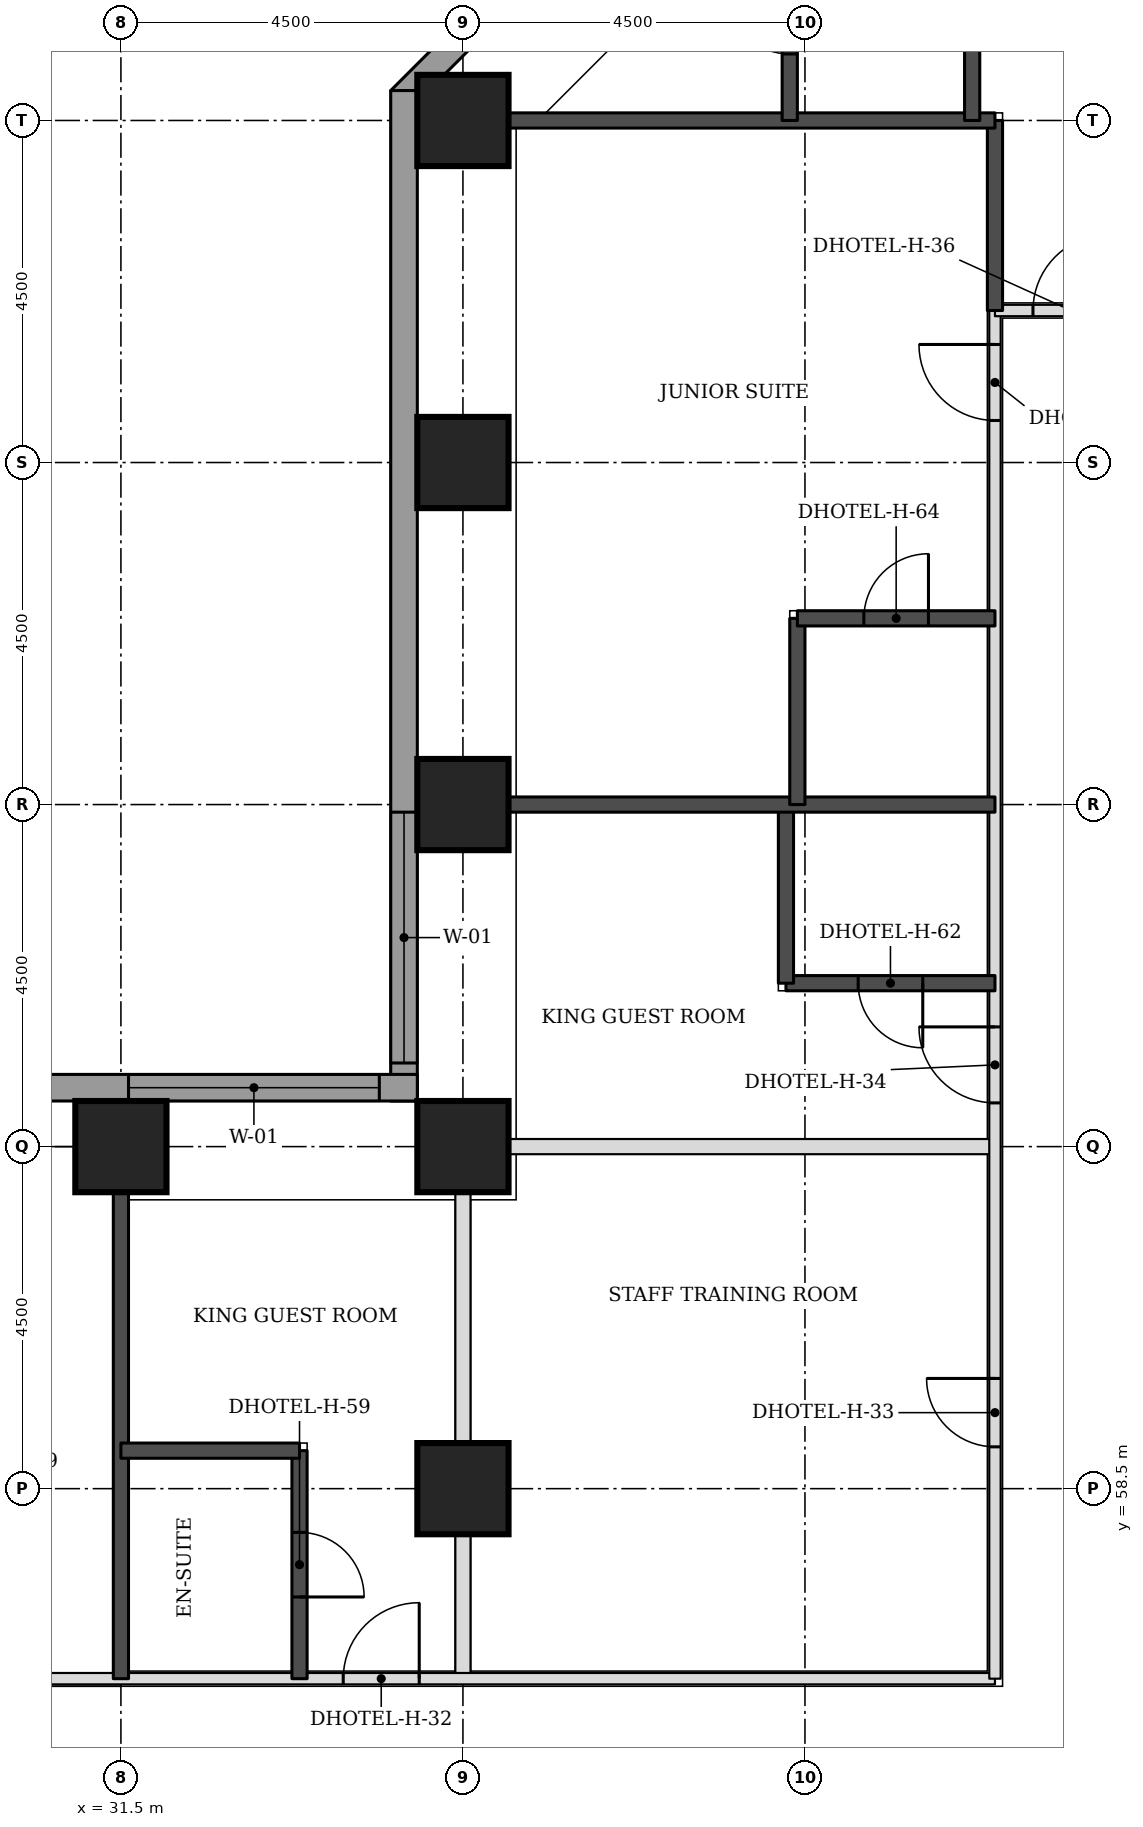
"""IFC4 building model, lengths in metres.
Left out: names, types, materials, properties, quantities, classifications, styles, units other than length and angle.
Written with IfcOpenShell. Run it as: python <this file> out.ifc"""

import sys

from ifc_helpers import new_model, si_unit, direction, frame, frame_2d, origin, origin_2d, place, context, subcontext, project, spatial, rectangle, extrude, element, fill, save


model = new_model("IFC4")
c1 = context("Model", 3, precision=1e-05, world=origin(), true_north=direction((0.0, 1.0)))
c2 = subcontext(c1, "Body", "Model", "MODEL_VIEW")
j1 = project(units=[si_unit("LENGTHUNIT", "METRE"), si_unit("PLANEANGLEUNIT", "RADIAN")], contexts=[c1])
p1 = place(None, origin())
s1 = spatial("IfcSite", under=j1, at=p1, CompositionType="ELEMENT")
p2 = place(p1, origin())
s2 = spatial("IfcBuilding", under=s1, at=p2, CompositionType="ELEMENT")
p3 = place(p2, frame((0.0, 0.0, 46.2)))
s3 = spatial("IfcBuildingStorey", under=s2, at=p3, CompositionType="ELEMENT", Elevation=46.2)
for number, where, z_axis, x_axis in (
    (1, (36.0, 58.5, 0.0), (0.0, 0.0, 1.0), (1.0, 0.0, 0.0)),
    (2, (31.5, 63.0, 0.0), (0.0, 0.0, 1.0), (1.0, 0.0, 0.0)),
    (3, (36.0, 63.0, 0.0), (0.0, 0.0, 1.0), (1.0, 0.0, 0.0)),
    (4, (36.0, 67.5, 0.0), (0.0, 0.0, 1.0), (1.0, 0.0, 0.0)),
    (5, (36.0, 72.0, 0.0), (0.0, 0.0, 1.0), (1.0, 0.0, 0.0)),
    (6, (36.0, 76.5, 0.0), (0.0, 0.0, 1.0), (1.0, 0.0, 0.0)),
):
    element("IfcColumn", number, at=place(p3, frame(where, z_axis=z_axis, x_axis=x_axis)), inside=s3, PredefinedType="COLUMN", context=c2, shape_type="SweptSolid", body=[
        extrude(rectangle(XDim=1.2, YDim=1.2, at=origin_2d()), origin(), (0.0, 0.0, 1.0), 3.3),
    ])
p4 = place(p3, frame((40.23, 81.826, 0.0), z_axis=(0.0, 0.0, 1.0), x_axis=(-0.707106781187, -0.707106781187, 0.0)))
e7 = element("IfcWall", 7, at=p4, inside=s3, PredefinedType="STANDARD", context=c2, shape_type="SweptSolid", body=[
    extrude(rectangle(XDim=7.151, YDim=0.35, at=frame_2d((3.576, 0.0))), origin(), (0.0, 0.0, 1.0), 3.055),
])
p5 = place(p4, frame((1.926, 0.0, 0.8)))
e8 = element("IfcOpeningElement", 8, at=p5, cuts=e7, PredefinedType="OPENING", context=c2, shape_type="SweptSolid", body=[
    extrude(rectangle(XDim=3.3, YDim=1.5, at=frame_2d((1.65, 0.75))), frame((0.0, 0.185, 0.0), z_axis=(0.0, -1.0, 0.0), x_axis=(1.0, 0.0, 0.0)), (0.0, 0.0, 1.0), 0.37),
])
p6 = place(p3, frame((35.225, 76.894, 0.0), z_axis=(0.0, 0.0, 1.0), x_axis=(0.0, -1.0, 0.0)))
e9 = element("IfcWall", 9, at=p6, inside=s3, PredefinedType="STANDARD", context=c2, shape_type="SweptSolid", body=[
    extrude(rectangle(XDim=13.293, YDim=0.35, at=frame_2d((6.647, 0.0))), origin(), (0.0, 0.0, 1.0), 3.055),
])
p7 = place(p6, frame((9.493, 0.0, 0.8)))
e10 = element("IfcOpeningElement", 10, at=p7, cuts=e9, PredefinedType="OPENING", context=c2, shape_type="SweptSolid", body=[
    extrude(rectangle(XDim=3.3, YDim=1.5, at=frame_2d((1.65, 0.75))), frame((0.0, 0.185, 0.0), z_axis=(0.0, -1.0, 0.0), x_axis=(1.0, 0.0, 0.0)), (0.0, 0.0, 1.0), 0.37),
])
p8 = place(p3, frame((35.4, 63.775, 0.0), z_axis=(0.0, 0.0, 1.0), x_axis=(-1.0, 0.0, 0.0)))
e11 = element("IfcWall", 11, at=p8, inside=s3, PredefinedType="STANDARD", context=c2, shape_type="SweptSolid", body=[
    extrude(rectangle(XDim=17.793, YDim=0.35, at=frame_2d((8.897, 0.0))), origin(), (0.0, 0.0, 1.0), 3.055),
])
p9 = place(p8, frame((0.5, 0.0, 0.8)))
e12 = element("IfcOpeningElement", 12, at=p9, cuts=e11, PredefinedType="OPENING", context=c2, shape_type="SweptSolid", body=[
    extrude(rectangle(XDim=3.3, YDim=1.5, at=frame_2d((1.65, 0.75))), frame((0.0, 0.185, 0.0), z_axis=(0.0, -1.0, 0.0), x_axis=(1.0, 0.0, 0.0)), (0.0, 0.0, 1.0), 0.37),
])
p10 = place(p8, frame((9.0, 0.0, 0.8)))
e13 = element("IfcOpeningElement", 13, at=p10, cuts=e11, PredefinedType="OPENING", context=c2, shape_type="SweptSolid", body=[
    extrude(rectangle(XDim=3.3, YDim=1.5, at=frame_2d((1.65, 0.75))), frame((0.0, 0.185, 0.0), z_axis=(0.0, -1.0, 0.0), x_axis=(1.0, 0.0, 0.0)), (0.0, 0.0, 1.0), 0.37),
])
p11 = place(p3, frame((36.0, 56.0, 0.0), z_axis=(0.0, 0.0, 1.0), x_axis=(0.0, 1.0, 0.0)))
e14 = element("IfcWall", 14, at=p11, inside=s3, PredefinedType="PARTITIONING", context=c2, shape_type="SweptSolid", body=[
    extrude(rectangle(XDim=6.4, YDim=0.2, at=frame_2d((3.2, 0.0))), origin(), (0.0, 0.0, 1.0), 2.33),
])
p12 = place(p3, frame((36.6, 63.0, 0.0), z_axis=(0.0, 0.0, 1.0), x_axis=(1.0, 0.0, 0.0)))
e15 = element("IfcWall", 15, at=p12, inside=s3, PredefinedType="PARTITIONING", context=c2, shape_type="SweptSolid", body=[
    extrude(rectangle(XDim=6.4, YDim=0.2, at=frame_2d((3.2, 0.0))), origin(), (0.0, 0.0, 1.0), 3.08),
])
p13 = place(p3, frame((27.0, 56.0, 0.0), z_axis=(0.0, 0.0, 1.0), x_axis=(1.0, 0.0, 0.0)))
e16 = element("IfcWall", 16, at=p13, inside=s3, PredefinedType="PARTITIONING", context=c2, shape_type="SweptSolid", body=[
    extrude(rectangle(XDim=16.0, YDim=0.15, at=frame_2d((8.0, 0.0))), origin(), (0.0, 0.0, 1.0), 3.08),
])
p14 = place(p13, frame((7.425, 0.0, 0.0)))
e17 = element("IfcOpeningElement", 17, at=p14, cuts=e16, PredefinedType="OPENING", context=c2, shape_type="SweptSolid", body=[
    extrude(rectangle(XDim=1.0, YDim=2.1, at=frame_2d((0.5, 1.05))), frame((0.0, 0.085, 0.0), z_axis=(0.0, -1.0, 0.0), x_axis=(1.0, 0.0, 0.0)), (0.0, 0.0, 1.0), 0.17),
])
p15 = place(p13, frame((1.91, 0.0, 0.0)))
e18 = element("IfcOpeningElement", 18, at=p15, cuts=e16, PredefinedType="OPENING", context=c2, shape_type="SweptSolid", body=[
    extrude(rectangle(XDim=0.9, YDim=2.1, at=frame_2d((0.45, 1.05))), frame((0.0, 0.085, 0.0), z_axis=(0.0, -1.0, 0.0), x_axis=(1.0, 0.0, 0.0)), (0.0, 0.0, 1.0), 0.17),
])
p16 = place(p3, frame((43.0, 56.0, 0.0), z_axis=(0.0, 0.0, 1.0), x_axis=(0.0, 1.0, 0.0)))
e19 = element("IfcWall", 19, at=p16, inside=s3, PredefinedType="PARTITIONING", context=c2, shape_type="SweptSolid", body=[
    extrude(rectangle(XDim=18.0, YDim=0.15, at=frame_2d((9.0, 0.0))), origin(), (0.0, 0.0, 1.0), 3.08),
])
p17 = place(p16, frame((7.575, 0.0, 0.0)))
e20 = element("IfcOpeningElement", 20, at=p17, cuts=e19, PredefinedType="OPENING", context=c2, shape_type="SweptSolid", body=[
    extrude(rectangle(XDim=1.0, YDim=2.1, at=frame_2d((0.5, 1.05))), frame((0.0, 0.085, 0.0), z_axis=(0.0, -1.0, 0.0), x_axis=(1.0, 0.0, 0.0)), (0.0, 0.0, 1.0), 0.17),
])
p18 = place(p16, frame((16.553, 0.0, 0.0)))
e21 = element("IfcOpeningElement", 21, at=p18, cuts=e19, PredefinedType="OPENING", context=c2, shape_type="SweptSolid", body=[
    extrude(rectangle(XDim=1.0, YDim=2.1, at=frame_2d((0.5, 1.05))), frame((0.0, 0.085, 0.0), z_axis=(0.0, -1.0, 0.0), x_axis=(1.0, 0.0, 0.0)), (0.0, 0.0, 1.0), 0.17),
])
p19 = place(p16, frame((3.05, 0.0, 0.0)))
e22 = element("IfcOpeningElement", 22, at=p19, cuts=e19, PredefinedType="OPENING", context=c2, shape_type="SweptSolid", body=[
    extrude(rectangle(XDim=0.9, YDim=2.1, at=frame_2d((0.45, 1.05))), frame((0.0, 0.085, 0.0), z_axis=(0.0, -1.0, 0.0), x_axis=(1.0, 0.0, 0.0)), (0.0, 0.0, 1.0), 0.17),
])
p20 = place(p3, frame((43.0, 74.0, 0.0), z_axis=(0.0, 0.0, 1.0), x_axis=(1.0, 0.0, 0.0)))
e23 = element("IfcWall", 23, at=p20, inside=s3, PredefinedType="PARTITIONING", context=c2, shape_type="SweptSolid", body=[
    extrude(rectangle(XDim=26.5, YDim=0.15, at=frame_2d((13.25, 0.0))), origin(), (0.0, 0.0, 1.0), 3.08),
])
p21 = place(p20, frame((2.575, 0.0, 0.0)))
e24 = element("IfcOpeningElement", 24, at=p21, cuts=e23, PredefinedType="OPENING", context=c2, shape_type="SweptSolid", body=[
    extrude(rectangle(XDim=1.0, YDim=2.1, at=frame_2d((0.5, 1.05))), frame((0.0, 0.085, 0.0), z_axis=(0.0, -1.0, 0.0), x_axis=(1.0, 0.0, 0.0)), (0.0, 0.0, 1.0), 0.17),
])
p22 = place(p20, frame((9.175, 0.0, 0.0)))
e25 = element("IfcOpeningElement", 25, at=p22, cuts=e23, PredefinedType="OPENING", context=c2, shape_type="SweptSolid", body=[
    extrude(rectangle(XDim=1.0, YDim=2.1, at=frame_2d((0.5, 1.05))), frame((0.0, 0.085, 0.0), z_axis=(0.0, -1.0, 0.0), x_axis=(1.0, 0.0, 0.0)), (0.0, 0.0, 1.0), 0.17),
])
p23 = place(p20, frame((11.575, 0.0, 0.0)))
e26 = element("IfcOpeningElement", 26, at=p23, cuts=e23, PredefinedType="OPENING", context=c2, shape_type="SweptSolid", body=[
    extrude(rectangle(XDim=1.0, YDim=2.1, at=frame_2d((0.5, 1.05))), frame((0.0, 0.085, 0.0), z_axis=(0.0, -1.0, 0.0), x_axis=(1.0, 0.0, 0.0)), (0.0, 0.0, 1.0), 0.17),
])
p24 = place(p20, frame((18.175, 0.0, 0.0)))
e27 = element("IfcOpeningElement", 27, at=p24, cuts=e23, PredefinedType="OPENING", context=c2, shape_type="SweptSolid", body=[
    extrude(rectangle(XDim=1.0, YDim=2.1, at=frame_2d((0.5, 1.05))), frame((0.0, 0.085, 0.0), z_axis=(0.0, -1.0, 0.0), x_axis=(1.0, 0.0, 0.0)), (0.0, 0.0, 1.0), 0.17),
])
p25 = place(p20, frame((20.575, 0.0, 0.0)))
e28 = element("IfcOpeningElement", 28, at=p25, cuts=e23, PredefinedType="OPENING", context=c2, shape_type="SweptSolid", body=[
    extrude(rectangle(XDim=1.0, YDim=2.1, at=frame_2d((0.5, 1.05))), frame((0.0, 0.085, 0.0), z_axis=(0.0, -1.0, 0.0), x_axis=(1.0, 0.0, 0.0)), (0.0, 0.0, 1.0), 0.17),
])
p26 = place(p20, frame((0.5, 0.0, 0.0)))
e29 = element("IfcOpeningElement", 29, at=p26, cuts=e23, PredefinedType="OPENING", context=c2, shape_type="SweptSolid", body=[
    extrude(rectangle(XDim=1.0, YDim=2.1, at=frame_2d((0.5, 1.05))), frame((0.0, 0.085, 0.0), z_axis=(0.0, -1.0, 0.0), x_axis=(1.0, 0.0, 0.0)), (0.0, 0.0, 1.0), 0.17),
])
p27 = place(p20, frame((25.0, 0.0, 0.0)))
e30 = element("IfcOpeningElement", 30, at=p27, cuts=e23, PredefinedType="OPENING", context=c2, shape_type="SweptSolid", body=[
    extrude(rectangle(XDim=1.0, YDim=2.1, at=frame_2d((0.5, 1.05))), frame((0.0, 0.085, 0.0), z_axis=(0.0, -1.0, 0.0), x_axis=(1.0, 0.0, 0.0)), (0.0, 0.0, 1.0), 0.17),
])
p28 = place(p3, frame((31.5, 56.0, 0.0), z_axis=(0.0, 0.0, 1.0), x_axis=(0.0, 1.0, 0.0)))
e31 = element("IfcWall", 31, at=p28, inside=s3, PredefinedType="SOLIDWALL", context=c2, shape_type="SweptSolid", body=[
    extrude(rectangle(XDim=6.4, YDim=0.2, at=frame_2d((3.2, 0.0))), origin(), (0.0, 0.0, 1.0), 3.08),
])
p29 = place(p3, frame((33.85, 56.0, 0.0), z_axis=(0.0, 0.0, 1.0), x_axis=(0.0, 1.0, 0.0)))
e32 = element("IfcWall", 32, at=p29, inside=s3, PredefinedType="SOLIDWALL", context=c2, shape_type="SweptSolid", body=[
    extrude(rectangle(XDim=3.0, YDim=0.2, at=frame_2d((1.5, 0.0))), origin(), (0.0, 0.0, 1.0), 3.08),
])
p30 = place(p29, frame((1.075, 0.0, 0.0)))
e33 = element("IfcOpeningElement", 33, at=p30, cuts=e32, PredefinedType="OPENING", context=c2, shape_type="SweptSolid", body=[
    extrude(rectangle(XDim=0.85, YDim=2.1, at=frame_2d((0.425, 1.05))), frame((0.0, 0.11, 0.0), z_axis=(0.0, -1.0, 0.0), x_axis=(1.0, 0.0, 0.0)), (0.0, 0.0, 1.0), 0.22),
])
p31 = place(p3, frame((31.5, 59.0, 0.0), z_axis=(0.0, 0.0, 1.0), x_axis=(1.0, 0.0, 0.0)))
e34 = element("IfcWall", 34, at=p31, inside=s3, PredefinedType="SOLIDWALL", context=c2, shape_type="SweptSolid", body=[
    extrude(rectangle(XDim=2.35, YDim=0.2, at=frame_2d((1.175, 0.0))), origin(), (0.0, 0.0, 1.0), 3.08),
])
p32 = place(p3, frame((40.25, 65.15, 0.0), z_axis=(0.0, 0.0, 1.0), x_axis=(1.0, 0.0, 0.0)))
e35 = element("IfcWall", 35, at=p32, inside=s3, PredefinedType="SOLIDWALL", context=c2, shape_type="SweptSolid", body=[
    extrude(rectangle(XDim=2.75, YDim=0.2, at=frame_2d((1.375, 0.0))), origin(), (0.0, 0.0, 1.0), 3.08),
])
p33 = place(p32, frame((0.95, 0.0, 0.0)))
e36 = element("IfcOpeningElement", 36, at=p33, cuts=e35, PredefinedType="OPENING", context=c2, shape_type="SweptSolid", body=[
    extrude(rectangle(XDim=0.85, YDim=2.1, at=frame_2d((0.425, 1.05))), frame((0.0, 0.11, 0.0), z_axis=(0.0, -1.0, 0.0), x_axis=(1.0, 0.0, 0.0)), (0.0, 0.0, 1.0), 0.22),
])
p34 = place(p3, frame((40.25, 65.15, 0.0), z_axis=(0.0, 0.0, 1.0), x_axis=(0.0, 1.0, 0.0)))
e37 = element("IfcWall", 37, at=p34, inside=s3, PredefinedType="SOLIDWALL", context=c2, shape_type="SweptSolid", body=[
    extrude(rectangle(XDim=2.35, YDim=0.2, at=frame_2d((1.175, 0.0))), origin(), (0.0, 0.0, 1.0), 3.08),
])
p35 = place(p3, frame((36.6, 67.5, 0.0), z_axis=(0.0, 0.0, 1.0), x_axis=(1.0, 0.0, 0.0)))
e38 = element("IfcWall", 38, at=p35, inside=s3, PredefinedType="SOLIDWALL", context=c2, shape_type="SweptSolid", body=[
    extrude(rectangle(XDim=6.4, YDim=0.2, at=frame_2d((3.2, 0.0))), origin(), (0.0, 0.0, 1.0), 3.08),
])
p36 = place(p3, frame((40.4, 67.5, 0.0), z_axis=(0.0, 0.0, 1.0), x_axis=(0.0, 1.0, 0.0)))
e39 = element("IfcWall", 39, at=p36, inside=s3, PredefinedType="SOLIDWALL", context=c2, shape_type="SweptSolid", body=[
    extrude(rectangle(XDim=2.45, YDim=0.2, at=frame_2d((1.225, 0.0))), origin(), (0.0, 0.0, 1.0), 3.08),
])
p37 = place(p3, frame((40.4, 69.95, 0.0), z_axis=(0.0, 0.0, 1.0), x_axis=(1.0, 0.0, 0.0)))
e40 = element("IfcWall", 40, at=p37, inside=s3, PredefinedType="SOLIDWALL", context=c2, shape_type="SweptSolid", body=[
    extrude(rectangle(XDim=2.6, YDim=0.2, at=frame_2d((1.3, 0.0))), origin(), (0.0, 0.0, 1.0), 3.08),
])
p38 = place(p37, frame((0.875, 0.0, 0.0)))
e41 = element("IfcOpeningElement", 41, at=p38, cuts=e40, PredefinedType="OPENING", context=c2, shape_type="SweptSolid", body=[
    extrude(rectangle(XDim=0.85, YDim=2.1, at=frame_2d((0.425, 1.05))), frame((0.0, 0.11, 0.0), z_axis=(0.0, -1.0, 0.0), x_axis=(1.0, 0.0, 0.0)), (0.0, 0.0, 1.0), 0.22),
])
p39 = place(p3, frame((43.0, 74.0, 0.0), z_axis=(0.0, 0.0, 1.0), x_axis=(0.0, 1.0, 0.0)))
e42 = element("IfcWall", 42, at=p39, inside=s3, PredefinedType="SOLIDWALL", context=c2, shape_type="SweptSolid", body=[
    extrude(rectangle(XDim=2.5, YDim=0.2, at=frame_2d((1.25, 0.0))), origin(), (0.0, 0.0, 1.0), 3.08),
])
p40 = place(p3, frame((36.6, 76.5, 0.0), z_axis=(0.0, 0.0, 1.0), x_axis=(1.0, 0.0, 0.0)))
e43 = element("IfcWall", 43, at=p40, inside=s3, PredefinedType="SOLIDWALL", context=c2, shape_type="SweptSolid", body=[
    extrude(rectangle(XDim=6.4, YDim=0.2, at=frame_2d((3.2, 0.0))), origin(), (0.0, 0.0, 1.0), 3.08),
])
p41 = place(p3, frame((40.3, 76.5, 0.0), z_axis=(0.0, 0.0, 1.0), x_axis=(0.0, 1.0, 0.0)))
e44 = element("IfcWall", 44, at=p41, inside=s3, PredefinedType="SOLIDWALL", context=c2, shape_type="SweptSolid", body=[
    extrude(rectangle(XDim=2.5, YDim=0.2, at=frame_2d((1.25, 0.0))), origin(), (0.0, 0.0, 1.0), 3.08),
])
p42 = place(p41, frame((0.875, 0.0, 0.0)))
e45 = element("IfcOpeningElement", 45, at=p42, cuts=e44, PredefinedType="OPENING", context=c2, shape_type="SweptSolid", body=[
    extrude(rectangle(XDim=0.85, YDim=2.1, at=frame_2d((0.425, 1.05))), frame((0.0, 0.11, 0.0), z_axis=(0.0, -1.0, 0.0), x_axis=(1.0, 0.0, 0.0)), (0.0, 0.0, 1.0), 0.22),
])
p43 = place(p3, frame((42.7, 76.5, 0.0), z_axis=(0.0, 0.0, 1.0), x_axis=(0.0, 1.0, 0.0)))
e46 = element("IfcWall", 46, at=p43, inside=s3, PredefinedType="SOLIDWALL", context=c2, shape_type="SweptSolid", body=[
    extrude(rectangle(XDim=2.5, YDim=0.2, at=frame_2d((1.25, 0.0))), origin(), (0.0, 0.0, 1.0), 3.08),
])
p44 = place(p7, origin())
e47 = element("IfcWindow", 47, at=p44, inside=s3, PartitioningType="SINGLE_PANEL", PredefinedType="WINDOW", context=c2, shape_type="SweptSolid", body=[
    extrude(rectangle(XDim=3.3, YDim=1.5, at=frame_2d((1.65, 0.75))), frame((0.0, 0.085, 0.0), z_axis=(0.0, -1.0, 0.0), x_axis=(1.0, 0.0, 0.0)), (0.0, 0.0, 1.0), 0.06),
])
fill(e10, e47)
p45 = place(p9, origin())
e48 = element("IfcWindow", 48, at=p45, inside=s3, PartitioningType="SINGLE_PANEL", PredefinedType="WINDOW", context=c2, shape_type="SweptSolid", body=[
    extrude(rectangle(XDim=3.3, YDim=1.5, at=frame_2d((1.65, 0.75))), frame((0.0, 0.085, 0.0), z_axis=(0.0, -1.0, 0.0), x_axis=(1.0, 0.0, 0.0)), (0.0, 0.0, 1.0), 0.06),
])
fill(e12, e48)
p46 = place(p14, origin())
e49 = element("IfcDoor", 49, at=p46, inside=s3, OperationType="SINGLE_SWING_RIGHT", PredefinedType="DOOR", context=c2, shape_type="SweptSolid", body=[
    extrude(rectangle(XDim=1.0, YDim=2.1, at=frame_2d((0.5, 1.05))), frame((0.0, 0.025, 0.0), z_axis=(0.0, -1.0, 0.0), x_axis=(1.0, 0.0, 0.0)), (0.0, 0.0, 1.0), 0.05),
])
fill(e17, e49)
p47 = place(p30, frame((0.85, 0.0, 0.0), z_axis=(0.0, 0.0, 1.0), x_axis=(-1.0, 0.0, 0.0)))
e50 = element("IfcDoor", 50, at=p47, inside=s3, OperationType="SINGLE_SWING_RIGHT", PredefinedType="DOOR", context=c2, shape_type="SweptSolid", body=[
    extrude(rectangle(XDim=0.85, YDim=2.1, at=frame_2d((0.425, 1.05))), frame((0.0, 0.025, 0.0), z_axis=(0.0, -1.0, 0.0), x_axis=(1.0, 0.0, 0.0)), (0.0, 0.0, 1.0), 0.05),
])
fill(e33, e50)
p48 = place(p17, origin())
e51 = element("IfcDoor", 51, at=p48, inside=s3, OperationType="SINGLE_SWING_RIGHT", PredefinedType="DOOR", context=c2, shape_type="SweptSolid", body=[
    extrude(rectangle(XDim=1.0, YDim=2.1, at=frame_2d((0.5, 1.05))), frame((0.0, 0.025, 0.0), z_axis=(0.0, -1.0, 0.0), x_axis=(1.0, 0.0, 0.0)), (0.0, 0.0, 1.0), 0.05),
])
fill(e20, e51)
p49 = place(p33, frame((0.85, 0.0, 0.0), z_axis=(0.0, 0.0, 1.0), x_axis=(-1.0, 0.0, 0.0)))
e52 = element("IfcDoor", 52, at=p49, inside=s3, OperationType="SINGLE_SWING_LEFT", PredefinedType="DOOR", context=c2, shape_type="SweptSolid", body=[
    extrude(rectangle(XDim=0.85, YDim=2.1, at=frame_2d((0.425, 1.05))), frame((0.0, 0.025, 0.0), z_axis=(0.0, -1.0, 0.0), x_axis=(1.0, 0.0, 0.0)), (0.0, 0.0, 1.0), 0.05),
])
fill(e36, e52)
p50 = place(p18, origin())
e53 = element("IfcDoor", 53, at=p50, inside=s3, OperationType="SINGLE_SWING_RIGHT", PredefinedType="DOOR", context=c2, shape_type="SweptSolid", body=[
    extrude(rectangle(XDim=1.0, YDim=2.1, at=frame_2d((0.5, 1.05))), frame((0.0, 0.025, 0.0), z_axis=(0.0, -1.0, 0.0), x_axis=(1.0, 0.0, 0.0)), (0.0, 0.0, 1.0), 0.05),
])
fill(e21, e53)
p51 = place(p38, origin())
e54 = element("IfcDoor", 54, at=p51, inside=s3, OperationType="SINGLE_SWING_RIGHT", PredefinedType="DOOR", context=c2, shape_type="SweptSolid", body=[
    extrude(rectangle(XDim=0.85, YDim=2.1, at=frame_2d((0.425, 1.05))), frame((0.0, 0.025, 0.0), z_axis=(0.0, -1.0, 0.0), x_axis=(1.0, 0.0, 0.0)), (0.0, 0.0, 1.0), 0.05),
])
fill(e41, e54)
p52 = place(p26, origin())
e55 = element("IfcDoor", 55, at=p52, inside=s3, OperationType="SINGLE_SWING_RIGHT", PredefinedType="DOOR", context=c2, shape_type="SweptSolid", body=[
    extrude(rectangle(XDim=1.0, YDim=2.1, at=frame_2d((0.5, 1.05))), frame((0.0, 0.025, 0.0), z_axis=(0.0, -1.0, 0.0), x_axis=(1.0, 0.0, 0.0)), (0.0, 0.0, 1.0), 0.05),
])
fill(e29, e55)
p53 = place(p42, origin())
e56 = element("IfcDoor", 56, at=p53, inside=s3, OperationType="SINGLE_SWING_RIGHT", PredefinedType="DOOR", context=c2, shape_type="SweptSolid", body=[
    extrude(rectangle(XDim=0.85, YDim=2.1, at=frame_2d((0.425, 1.05))), frame((0.0, 0.025, 0.0), z_axis=(0.0, -1.0, 0.0), x_axis=(1.0, 0.0, 0.0)), (0.0, 0.0, 1.0), 0.05),
])
fill(e45, e56)
p54 = place(p19, origin())
e57 = element("IfcDoor", 57, at=p54, inside=s3, OperationType="SINGLE_SWING_RIGHT", PredefinedType="DOOR", context=c2, shape_type="SweptSolid", body=[
    extrude(rectangle(XDim=0.9, YDim=2.1, at=frame_2d((0.45, 1.05))), frame((0.0, 0.025, 0.0), z_axis=(0.0, -1.0, 0.0), x_axis=(1.0, 0.0, 0.0)), (0.0, 0.0, 1.0), 0.05),
])
fill(e22, e57)
save(model, sys.argv[1])
